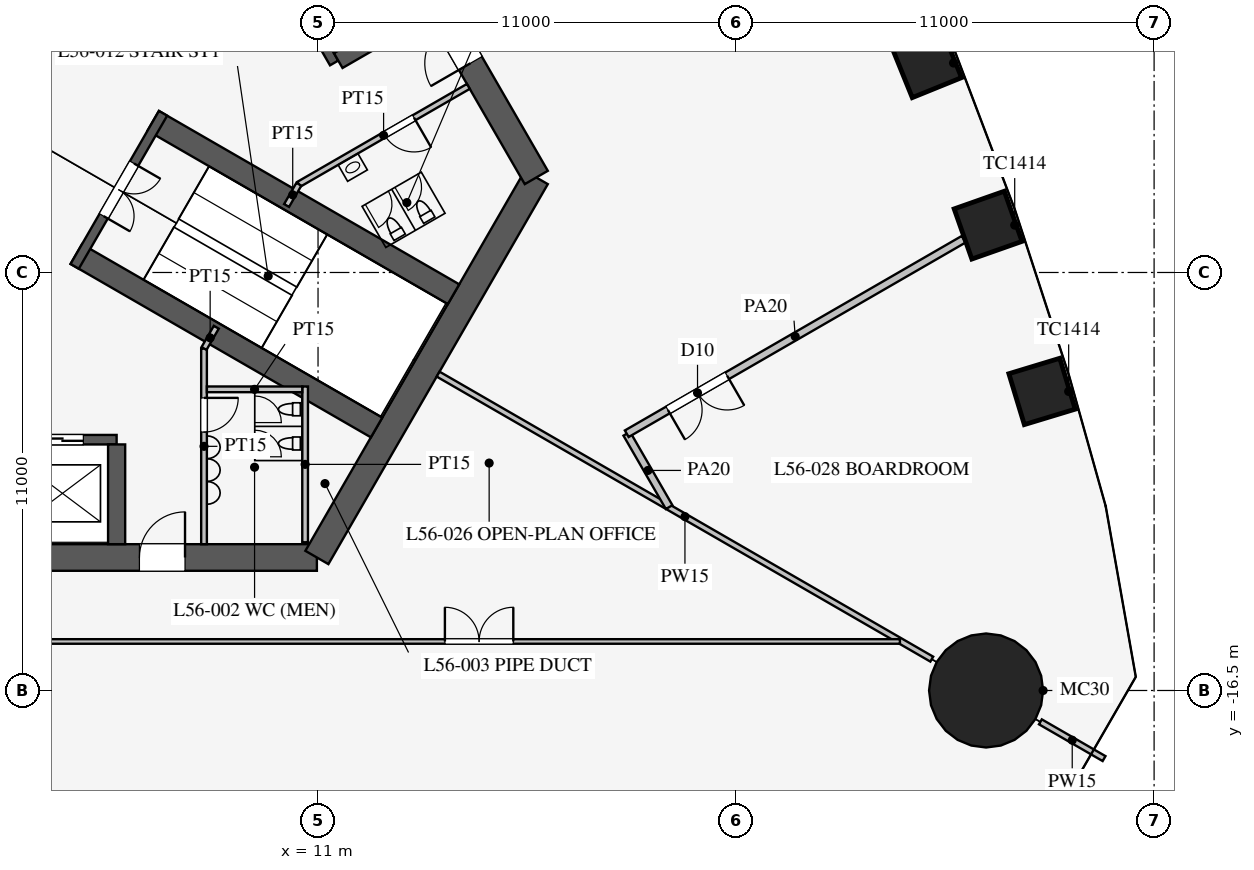
"""IFC4 building model, lengths in metres.
Left out: names, types, materials, properties, quantities, classifications, styles, units other than length and angle.
Written with IfcOpenShell. Run it as: python <this file> out.ifc"""

import sys

from ifc_helpers import new_model, si_unit, direction, frame, frame_2d, origin, origin_2d, place, context, subcontext, project, spatial, rectangle, circle, extrude, element, fill, save


model = new_model("IFC4")
c1 = context("Model", 3, precision=1e-05, world=origin(), true_north=direction((0.0, 1.0)))
c2 = subcontext(c1, "Body", "Model", "MODEL_VIEW")
j1 = project(units=[si_unit("LENGTHUNIT", "METRE"), si_unit("PLANEANGLEUNIT", "RADIAN")], contexts=[c1])
p1 = place(None, origin())
s1 = spatial("IfcSite", under=j1, at=p1, CompositionType="ELEMENT")
p2 = place(p1, origin())
s2 = spatial("IfcBuilding", under=s1, at=p2, CompositionType="ELEMENT")
p3 = place(p2, frame((0.0, 0.0, 244.3)))
s3 = spatial("IfcBuildingStorey", under=s2, at=p3, CompositionType="ELEMENT", Elevation=244.3)
for number, where, z_axis, x_axis in (
    (1, (30.052, -8.63, 0.0), (0.0, 0.0, 1.0), (-0.29, 0.957, 0.0)),
    (2, (28.632, -4.254, 0.0), (0.0, 0.0, 1.0), (-0.332, 0.943, 0.0)),
    (3, (27.022, 0.013, 0.0), (0.0, 0.0, 1.0), (-0.376, 0.927, 0.0)),
):
    element("IfcColumn", number, at=place(p3, frame(where, z_axis=z_axis, x_axis=x_axis)), inside=s3, PredefinedType="COLUMN", context=c2, shape_type="SweptSolid", body=[
        extrude(rectangle(XDim=1.4, YDim=1.4, at=origin_2d()), origin(), (0.0, 0.0, 1.0), 4.2),
    ])
p4 = place(p3, frame((28.579, -16.5, 0.0), z_axis=(0.0, 0.0, 1.0), x_axis=(1.0, 0.0, 0.0)))
e4 = element("IfcColumn", 4, at=p4, inside=s3, PredefinedType="COLUMN", context=c2, shape_type="SweptSolid", body=[
    extrude(circle(Radius=1.5, at=origin_2d()), origin(), (0.0, 0.0, 1.0), 4.2),
])
p5 = place(p3, frame((-10.97, -13.0, 0.0), z_axis=(0.0, 0.0, 1.0), x_axis=(1.0, 0.0, 0.0)))
e5 = element("IfcWall", 5, at=p5, inside=s3, PredefinedType="SHEAR", context=c2, shape_type="SweptSolid", body=[
    extrude(rectangle(XDim=21.939, YDim=0.7, at=frame_2d((10.97, 0.0))), origin(), (0.0, 0.0, 1.0), 4.2),
])
p6 = place(p5, frame((17.27, 0.0, 0.0)))
e6 = element("IfcOpeningElement", 6, at=p6, cuts=e5, PredefinedType="OPENING", context=c2, shape_type="SweptSolid", body=[
    extrude(rectangle(XDim=1.2, YDim=2.1, at=frame_2d((0.6, 1.05))), frame((0.0, 0.36, 0.0), z_axis=(0.0, -1.0, 0.0), x_axis=(1.0, 0.0, 0.0)), (0.0, 0.0, 1.0), 0.72),
])
p7 = place(p5, frame((3.47, 0.0, 0.0)))
e7 = element("IfcOpeningElement", 7, at=p7, cuts=e5, PredefinedType="OPENING", context=c2, shape_type="SweptSolid", body=[
    extrude(rectangle(XDim=1.2, YDim=2.1, at=frame_2d((0.6, 1.05))), frame((0.0, 0.36, 0.0), z_axis=(0.0, -1.0, 0.0), x_axis=(1.0, 0.0, 0.0)), (0.0, 0.0, 1.0), 0.72),
])
p8 = place(p3, frame((10.97, -13.0, 0.0), z_axis=(0.0, 0.0, 1.0), x_axis=(0.499995765644, 0.866027848477, 0.0)))
e8 = element("IfcWall", 8, at=p8, inside=s3, PredefinedType="SHEAR", context=c2, shape_type="SweptSolid", body=[
    extrude(rectangle(XDim=11.547, YDim=0.7, at=frame_2d((5.773, 0.0))), origin(), (0.0, 0.0, 1.0), 4.2),
])
p9 = place(p3, frame((16.743, -3.0, 0.0), z_axis=(0.0, 0.0, 1.0), x_axis=(-0.500002442456, 0.866023993627, 0.0)))
e9 = element("IfcWall", 9, at=p9, inside=s3, PredefinedType="SHEAR", context=c2, shape_type="SweptSolid", body=[
    extrude(rectangle(XDim=21.939, YDim=0.7, at=frame_2d((10.97, 0.0))), origin(), (0.0, 0.0, 1.0), 4.2),
])
p10 = place(p9, frame((17.27, 0.0, 0.0)))
e10 = element("IfcOpeningElement", 10, at=p10, cuts=e9, PredefinedType="OPENING", context=c2, shape_type="SweptSolid", body=[
    extrude(rectangle(XDim=1.2, YDim=2.1, at=frame_2d((0.6, 1.05))), frame((0.0, 0.36, 0.0), z_axis=(0.0, -1.0, 0.0), x_axis=(1.0, 0.0, 0.0)), (0.0, 0.0, 1.0), 0.72),
])
p11 = place(p9, frame((3.47, 0.0, 0.0)))
e11 = element("IfcOpeningElement", 11, at=p11, cuts=e9, PredefinedType="OPENING", context=c2, shape_type="SweptSolid", body=[
    extrude(rectangle(XDim=1.2, YDim=2.1, at=frame_2d((0.6, 1.05))), frame((0.0, 0.36, 0.0), z_axis=(0.0, -1.0, 0.0), x_axis=(1.0, 0.0, 0.0)), (0.0, 0.0, 1.0), 0.72),
])
p12 = place(p3, frame((-5.7, -9.9, 0.0), z_axis=(0.0, 0.0, 1.0), x_axis=(1.0, 0.0, 0.0)))
e12 = element("IfcWall", 12, at=p12, inside=s3, PredefinedType="SHEAR", context=c2, shape_type="SweptSolid", body=[
    extrude(rectangle(XDim=11.4, YDim=0.25, at=frame_2d((5.7, 0.0))), origin(), (0.0, 0.0, 1.0), 4.2),
])
p13 = place(p12, frame((0.875, 0.0, 0.0)))
e13 = element("IfcOpeningElement", 13, at=p13, cuts=e12, PredefinedType="OPENING", context=c2, shape_type="SweptSolid", body=[
    extrude(rectangle(XDim=1.1, YDim=2.2, at=frame_2d((0.55, 1.1))), frame((0.0, 0.135, 0.0), z_axis=(0.0, -1.0, 0.0), x_axis=(1.0, 0.0, 0.0)), (0.0, 0.0, 1.0), 0.27),
])
p14 = place(p12, frame((3.725, 0.0, 0.0)))
e14 = element("IfcOpeningElement", 14, at=p14, cuts=e12, PredefinedType="OPENING", context=c2, shape_type="SweptSolid", body=[
    extrude(rectangle(XDim=1.1, YDim=2.2, at=frame_2d((0.55, 1.1))), frame((0.0, 0.135, 0.0), z_axis=(0.0, -1.0, 0.0), x_axis=(1.0, 0.0, 0.0)), (0.0, 0.0, 1.0), 0.27),
])
p15 = place(p12, frame((6.575, 0.0, 0.0)))
e15 = element("IfcOpeningElement", 15, at=p15, cuts=e12, PredefinedType="OPENING", context=c2, shape_type="SweptSolid", body=[
    extrude(rectangle(XDim=1.1, YDim=2.2, at=frame_2d((0.55, 1.1))), frame((0.0, 0.135, 0.0), z_axis=(0.0, -1.0, 0.0), x_axis=(1.0, 0.0, 0.0)), (0.0, 0.0, 1.0), 0.27),
])
p16 = place(p12, frame((9.425, 0.0, 0.0)))
e16 = element("IfcOpeningElement", 16, at=p16, cuts=e12, PredefinedType="OPENING", context=c2, shape_type="SweptSolid", body=[
    extrude(rectangle(XDim=1.1, YDim=2.2, at=frame_2d((0.55, 1.1))), frame((0.0, 0.135, 0.0), z_axis=(0.0, -1.0, 0.0), x_axis=(1.0, 0.0, 0.0)), (0.0, 0.0, 1.0), 0.27),
])
p17 = place(p3, frame((5.7, -10.025, 0.0), z_axis=(0.0, 0.0, 1.0), x_axis=(0.0, -1.0, 0.0)))
e17 = element("IfcWall", 17, at=p17, inside=s3, PredefinedType="SHEAR", context=c2, shape_type="SweptSolid", body=[
    extrude(rectangle(XDim=2.625, YDim=0.45, at=frame_2d((1.312, 0.0))), origin(), (0.0, 0.0, 1.0), 4.2),
])
p18 = place(p3, frame((11.424, 0.014, 0.0), z_axis=(0.0, 0.0, 1.0), x_axis=(-0.500001763848, 0.866024385424, 0.0)))
e18 = element("IfcWall", 18, at=p18, inside=s3, PredefinedType="SHEAR", context=c2, shape_type="SweptSolid", body=[
    extrude(rectangle(XDim=11.4, YDim=0.25, at=frame_2d((5.7, 0.0))), origin(), (0.0, 0.0, 1.0), 4.2),
])
p19 = place(p18, frame((0.975, 0.0, 0.0)))
e19 = element("IfcOpeningElement", 19, at=p19, cuts=e18, PredefinedType="OPENING", context=c2, shape_type="SweptSolid", body=[
    extrude(rectangle(XDim=0.9, YDim=2.1, at=frame_2d((0.45, 1.05))), frame((0.0, 0.135, 0.0), z_axis=(0.0, -1.0, 0.0), x_axis=(1.0, 0.0, 0.0)), (0.0, 0.0, 1.0), 0.27),
])
p20 = place(p18, frame((3.825, 0.0, 0.0)))
e20 = element("IfcOpeningElement", 20, at=p20, cuts=e18, PredefinedType="OPENING", context=c2, shape_type="SweptSolid", body=[
    extrude(rectangle(XDim=0.9, YDim=2.1, at=frame_2d((0.45, 1.05))), frame((0.0, 0.135, 0.0), z_axis=(0.0, -1.0, 0.0), x_axis=(1.0, 0.0, 0.0)), (0.0, 0.0, 1.0), 0.27),
])
p21 = place(p18, frame((6.675, 0.0, 0.0)))
e21 = element("IfcOpeningElement", 21, at=p21, cuts=e18, PredefinedType="OPENING", context=c2, shape_type="SweptSolid", body=[
    extrude(rectangle(XDim=0.9, YDim=2.1, at=frame_2d((0.45, 1.05))), frame((0.0, 0.135, 0.0), z_axis=(0.0, -1.0, 0.0), x_axis=(1.0, 0.0, 0.0)), (0.0, 0.0, 1.0), 0.27),
])
p22 = place(p18, frame((9.525, 0.0, 0.0)))
e22 = element("IfcOpeningElement", 22, at=p22, cuts=e18, PredefinedType="OPENING", context=c2, shape_type="SweptSolid", body=[
    extrude(rectangle(XDim=0.9, YDim=2.1, at=frame_2d((0.45, 1.05))), frame((0.0, 0.135, 0.0), z_axis=(0.0, -1.0, 0.0), x_axis=(1.0, 0.0, 0.0)), (0.0, 0.0, 1.0), 0.27),
])
p23 = place(p3, frame((11.532, 0.076, 0.0), z_axis=(0.0, 0.0, 1.0), x_axis=(0.866013657776, 0.500020344131, 0.0)))
e23 = element("IfcWall", 23, at=p23, inside=s3, PredefinedType="SHEAR", context=c2, shape_type="SweptSolid", body=[
    extrude(rectangle(XDim=2.625, YDim=0.45, at=frame_2d((1.312, 0.0))), origin(), (0.0, 0.0, 1.0), 4.2),
])
for number, where, z_axis, x_axis in (
    (24, (4.638, -5.016, 0.0), (0.0, 0.0, 1.0), (0.866, -0.5, 0.0)),
    (25, (6.663, -1.509, 0.0), (0.0, 0.0, 1.0), (0.866, -0.5, 0.0)),
):
    element("IfcWall", number, at=place(p3, frame(where, z_axis=z_axis, x_axis=x_axis)), inside=s3, PredefinedType="SHEAR", context=c2, shape_type="SweptSolid", body=[
        extrude(rectangle(XDim=9.125, YDim=0.6, at=frame_2d((4.562, 0.0))), origin(), (0.0, 0.0, 1.0), 4.2),
    ])
p24 = place(p3, frame((4.597, -5.339, 0.0), z_axis=(0.0, 0.0, 1.0), x_axis=(0.499984536904, 0.866034331223, 0.0)))
e26 = element("IfcWall", 26, at=p24, inside=s3, PredefinedType="SHEAR", context=c2, shape_type="SweptSolid", body=[
    extrude(rectangle(XDim=4.65, YDim=0.25, at=frame_2d((2.325, 0.0))), origin(), (0.0, 0.0, 1.0), 4.2),
])
p25 = place(p24, frame((1.525, 0.0, 0.0)))
e27 = element("IfcOpeningElement", 27, at=p25, cuts=e26, PredefinedType="OPENING", context=c2, shape_type="SweptSolid", body=[
    extrude(rectangle(XDim=1.6, YDim=2.1, at=frame_2d((0.8, 1.05))), frame((0.0, 0.135, 0.0), z_axis=(0.0, -1.0, 0.0), x_axis=(1.0, 0.0, 0.0)), (0.0, 0.0, 1.0), 0.27),
])
p26 = place(p3, frame((8.0, -7.5, 0.0), z_axis=(0.0, 0.0, 1.0), x_axis=(0.0, -1.0, 0.0)))
e28 = element("IfcWall", 28, at=p26, inside=s3, PredefinedType="PARTITIONING", context=c2, shape_type="SweptSolid", body=[
    extrude(rectangle(XDim=5.15, YDim=0.15, at=frame_2d((2.575, 0.0))), origin(), (0.0, 0.0, 1.0), 4.0),
])
p27 = place(p26, frame((1.3, 0.0, 0.0)))
e29 = element("IfcOpeningElement", 29, at=p27, cuts=e28, PredefinedType="OPENING", context=c2, shape_type="SweptSolid", body=[
    extrude(rectangle(XDim=0.9, YDim=2.1, at=frame_2d((0.45, 1.05))), frame((0.0, 0.085, 0.0), z_axis=(0.0, -1.0, 0.0), x_axis=(1.0, 0.0, 0.0)), (0.0, 0.0, 1.0), 0.17),
])
p28 = place(p3, frame((10.495, -3.178, 0.0), z_axis=(0.0, 0.0, 1.0), x_axis=(0.866037967349, 0.499978238636, 0.0)))
e30 = element("IfcWall", 30, at=p28, inside=s3, PredefinedType="PARTITIONING", context=c2, shape_type="SweptSolid", body=[
    extrude(rectangle(XDim=5.15, YDim=0.15, at=frame_2d((2.575, 0.0))), origin(), (0.0, 0.0, 1.0), 4.0),
])
p29 = place(p28, frame((2.6, 0.0, 0.0)))
e31 = element("IfcOpeningElement", 31, at=p29, cuts=e30, PredefinedType="OPENING", context=c2, shape_type="SweptSolid", body=[
    extrude(rectangle(XDim=0.9, YDim=2.1, at=frame_2d((0.45, 1.05))), frame((0.0, 0.085, 0.0), z_axis=(0.0, -1.0, 0.0), x_axis=(1.0, 0.0, 0.0)), (0.0, 0.0, 1.0), 0.17),
])
for number, where, z_axis, x_axis in (
    (32, (8.0, -7.5, 0.0), (0.0, 0.0, 1.0), (0.5, 0.866, 0.0)),
    (33, (10.495, -3.178, 0.0), (0.0, 0.0, 1.0), (-0.5, -0.866, 0.0)),
):
    element("IfcWall", number, at=place(p3, frame(where, z_axis=z_axis, x_axis=x_axis)), inside=s3, PredefinedType="PARTITIONING", context=c2, shape_type="SweptSolid", body=[
        extrude(rectangle(XDim=0.645, YDim=0.15, at=frame_2d((0.323, 0.0))), origin(), (0.0, 0.0, 1.0), 4.0),
    ])
p30 = place(p3, frame((10.66, -8.5, 0.0), z_axis=(0.0, 0.0, 1.0), x_axis=(0.0, -1.0, 0.0)))
e34 = element("IfcWall", 34, at=p30, inside=s3, PredefinedType="PARTITIONING", context=c2, shape_type="SweptSolid", body=[
    extrude(rectangle(XDim=4.1, YDim=0.15, at=frame_2d((2.05, 0.0))), origin(), (0.0, 0.0, 1.0), 4.0),
])
p31 = place(p3, frame((8.075, -8.575, 0.0), z_axis=(0.0, 0.0, 1.0), x_axis=(1.0, 0.0, 0.0)))
e35 = element("IfcWall", 35, at=p31, inside=s3, PredefinedType="PARTITIONING", context=c2, shape_type="SweptSolid", body=[
    extrude(rectangle(XDim=2.51, YDim=0.15, at=frame_2d((1.255, 0.0))), origin(), (0.0, 0.0, 1.0), 4.0),
])
p32 = place(p3, frame((14.159, -8.175, 0.0), z_axis=(0.0, 0.0, 1.0), x_axis=(0.866027028085, -0.499997186618, 0.0)))
e36 = element("IfcWall", 36, at=p32, inside=s3, PredefinedType="PARTITIONING", context=c2, shape_type="SweptSolid", body=[
    extrude(rectangle(XDim=15.0, YDim=0.15, at=frame_2d((7.5, 0.0))), origin(), (0.0, 0.0, 1.0), 2.4),
])
p33 = place(p3, frame((30.008, -17.325, 0.0), z_axis=(0.0, 0.0, 1.0), x_axis=(0.866013246922, -0.500021055713, 0.0)))
e37 = element("IfcWall", 37, at=p33, inside=s3, PredefinedType="PARTITIONING", context=c2, shape_type="SweptSolid", body=[
    extrude(rectangle(XDim=1.935, YDim=0.15, at=frame_2d((0.967, 0.0))), origin(), (0.0, 0.0, 1.0), 2.4),
])
p34 = place(p3, frame((-26.312, -15.21, 0.0), z_axis=(0.0, 0.0, 1.0), x_axis=(1.0, 0.0, 0.0)))
e38 = element("IfcWall", 38, at=p34, inside=s3, PredefinedType="PARTITIONING", context=c2, shape_type="SweptSolid", body=[
    extrude(rectangle(XDim=52.624, YDim=0.12, at=frame_2d((26.312, 0.0))), origin(), (0.0, 0.0, 1.0), 2.9),
])
p35 = place(p34, frame((10.15, 0.0, 0.15)))
e39 = element("IfcOpeningElement", 39, at=p35, cuts=e38, PredefinedType="OPENING", context=c2, shape_type="SweptSolid", body=[
    extrude(rectangle(XDim=1.8, YDim=2.1, at=frame_2d((0.9, 1.05))), frame((0.0, 0.07, 0.0), z_axis=(0.0, -1.0, 0.0), x_axis=(1.0, 0.0, 0.0)), (0.0, 0.0, 1.0), 0.14),
])
p36 = place(p34, frame((40.65, 0.0, 0.15)))
e40 = element("IfcOpeningElement", 40, at=p36, cuts=e38, PredefinedType="OPENING", context=c2, shape_type="SweptSolid", body=[
    extrude(rectangle(XDim=1.8, YDim=2.1, at=frame_2d((0.9, 1.05))), frame((0.0, 0.07, 0.0), z_axis=(0.0, -1.0, 0.0), x_axis=(1.0, 0.0, 0.0)), (0.0, 0.0, 1.0), 0.14),
])
p37 = place(p3, frame((19.124, -9.743, 0.0), z_axis=(0.0, 0.0, 1.0), x_axis=(0.500047783504, -0.865997814208, 0.0)))
e41 = element("IfcWall", 41, at=p37, inside=s3, PredefinedType="PARTITIONING", context=c2, shape_type="SweptSolid", body=[
    extrude(rectangle(XDim=2.23, YDim=0.2, at=frame_2d((1.115, 0.0))), origin(), (0.0, 0.0, 1.0), 2.9),
])
p38 = place(p3, frame((19.124, -9.743, 0.0), z_axis=(0.0, 0.0, 1.0), x_axis=(0.866033076574, 0.499986710104, 0.0)))
e42 = element("IfcWall", 42, at=p38, inside=s3, PredefinedType="PARTITIONING", context=c2, shape_type="SweptSolid", body=[
    extrude(rectangle(XDim=10.237, YDim=0.2, at=frame_2d((5.118, 0.0))), origin(), (0.0, 0.0, 1.0), 2.8),
])
p39 = place(p38, frame((1.25, 0.0, 0.15)))
e43 = element("IfcOpeningElement", 43, at=p39, cuts=e42, PredefinedType="OPENING", context=c2, shape_type="SweptSolid", body=[
    extrude(rectangle(XDim=1.8, YDim=2.1, at=frame_2d((0.9, 1.05))), frame((0.0, 0.11, 0.0), z_axis=(0.0, -1.0, 0.0), x_axis=(1.0, 0.0, 0.0)), (0.0, 0.0, 1.0), 0.22),
])
p40 = place(p27, origin())
e44 = element("IfcDoor", 44, at=p40, inside=s3, OperationType="SINGLE_SWING_LEFT", PredefinedType="DOOR", context=c2, shape_type="SweptSolid", body=[
    extrude(rectangle(XDim=0.9, YDim=2.1, at=frame_2d((0.45, 1.05))), frame((0.0, 0.025, 0.0), z_axis=(0.0, -1.0, 0.0), x_axis=(1.0, 0.0, 0.0)), (0.0, 0.0, 1.0), 0.05),
])
fill(e29, e44)
p41 = place(p29, frame((0.9, 0.0, 0.0), z_axis=(0.0, 0.0, 1.0), x_axis=(-1.0, 0.0, 0.0)))
e45 = element("IfcDoor", 45, at=p41, inside=s3, OperationType="SINGLE_SWING_LEFT", PredefinedType="DOOR", context=c2, shape_type="SweptSolid", body=[
    extrude(rectangle(XDim=0.9, YDim=2.1, at=frame_2d((0.45, 1.05))), frame((0.0, 0.025, 0.0), z_axis=(0.0, -1.0, 0.0), x_axis=(1.0, 0.0, 0.0)), (0.0, 0.0, 1.0), 0.05),
])
fill(e31, e45)
p42 = place(p25, frame((1.6, 0.0, 0.0), z_axis=(0.0, 0.0, 1.0), x_axis=(-1.0, 0.0, 0.0)))
e46 = element("IfcDoor", 46, at=p42, inside=s3, OperationType="DOUBLE_DOOR_SINGLE_SWING", PredefinedType="DOOR", context=c2, shape_type="SweptSolid", body=[
    extrude(rectangle(XDim=1.6, YDim=2.1, at=frame_2d((0.8, 1.05))), frame((0.0, 0.025, 0.0), z_axis=(0.0, -1.0, 0.0), x_axis=(1.0, 0.0, 0.0)), (0.0, 0.0, 1.0), 0.05),
])
fill(e27, e46)
p43 = place(p6, origin())
e47 = element("IfcDoor", 47, at=p43, inside=s3, OperationType="SINGLE_SWING_RIGHT", PredefinedType="DOOR", context=c2, shape_type="SweptSolid", body=[
    extrude(rectangle(XDim=1.2, YDim=2.1, at=frame_2d((0.6, 1.05))), frame((0.0, 0.025, 0.0), z_axis=(0.0, -1.0, 0.0), x_axis=(1.0, 0.0, 0.0)), (0.0, 0.0, 1.0), 0.05),
])
fill(e6, e47)
p44 = place(p11, origin())
e48 = element("IfcDoor", 48, at=p44, inside=s3, OperationType="SINGLE_SWING_LEFT", PredefinedType="DOOR", context=c2, shape_type="SweptSolid", body=[
    extrude(rectangle(XDim=1.2, YDim=2.1, at=frame_2d((0.6, 1.05))), frame((0.0, 0.025, 0.0), z_axis=(0.0, -1.0, 0.0), x_axis=(1.0, 0.0, 0.0)), (0.0, 0.0, 1.0), 0.05),
])
fill(e11, e48)
p45 = place(p36, origin())
e49 = element("IfcDoor", 49, at=p45, inside=s3, OperationType="DOUBLE_DOOR_SINGLE_SWING", PredefinedType="DOOR", context=c2, shape_type="SweptSolid", body=[
    extrude(rectangle(XDim=1.8, YDim=2.1, at=frame_2d((0.9, 1.05))), frame((0.0, 0.025, 0.0), z_axis=(0.0, -1.0, 0.0), x_axis=(1.0, 0.0, 0.0)), (0.0, 0.0, 1.0), 0.05),
])
fill(e40, e49)
p46 = place(p39, frame((1.8, 0.0, 0.0), z_axis=(0.0, 0.0, 1.0), x_axis=(-1.0, 0.0, 0.0)))
e50 = element("IfcDoor", 50, at=p46, inside=s3, OperationType="DOUBLE_DOOR_SINGLE_SWING", PredefinedType="DOOR", context=c2, shape_type="SweptSolid", body=[
    extrude(rectangle(XDim=1.8, YDim=2.1, at=frame_2d((0.9, 1.05))), frame((0.0, 0.025, 0.0), z_axis=(0.0, -1.0, 0.0), x_axis=(1.0, 0.0, 0.0)), (0.0, 0.0, 1.0), 0.05),
])
fill(e43, e50)
p47 = place(p16, origin())
e51 = element("IfcDoor", 51, at=p47, inside=s3, OperationType="DOUBLE_DOOR_SLIDING", PredefinedType="DOOR", context=c2, shape_type="SweptSolid", body=[
    extrude(rectangle(XDim=1.1, YDim=2.2, at=frame_2d((0.55, 1.1))), frame((0.0, 0.025, 0.0), z_axis=(0.0, -1.0, 0.0), x_axis=(1.0, 0.0, 0.0)), (0.0, 0.0, 1.0), 0.05),
])
fill(e16, e51)
save(model, sys.argv[1])
